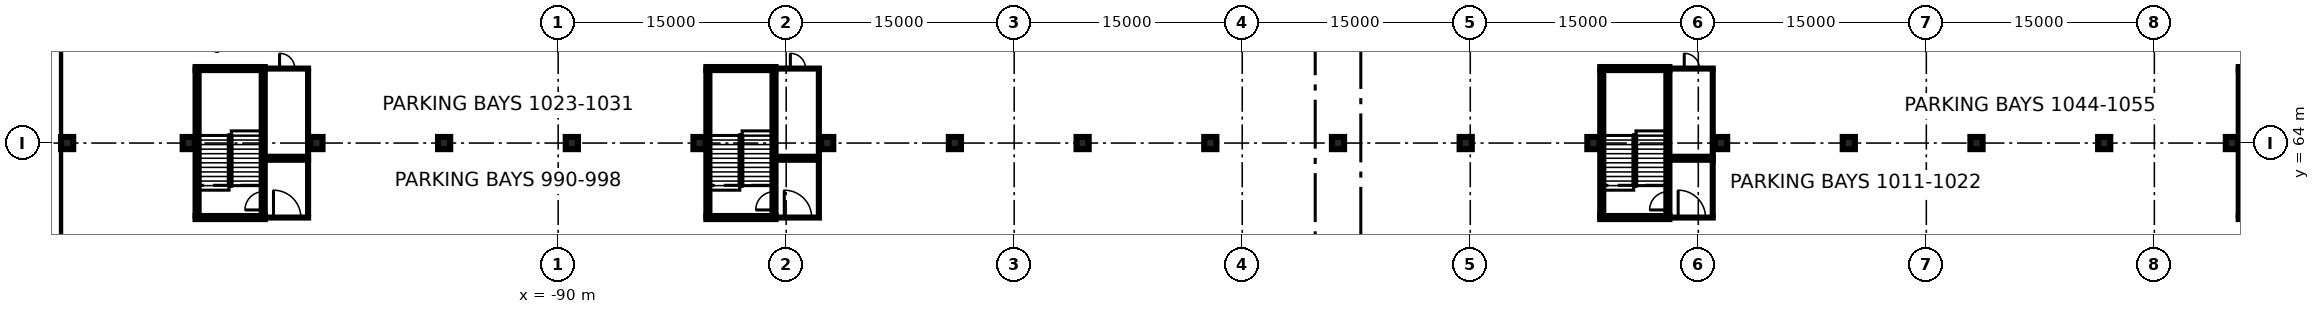
"""IFC4 building model, lengths in metres.
Left out: names, types, materials, properties, quantities, classifications, styles, units other than length and angle.
Written with IfcOpenShell. Run it as: python <this file> out.ifc"""

import sys

from ifc_helpers import new_model, si_unit, direction, frame, frame_2d, origin, origin_2d, place, context, subcontext, project, spatial, rectangle, extrude, element, fill, save


model = new_model("IFC4")
c1 = context("Model", 3, precision=1e-05, world=origin(), true_north=direction((0.0, 1.0)))
c2 = subcontext(c1, "Body", "Model", "MODEL_VIEW")
j1 = project(units=[si_unit("LENGTHUNIT", "METRE"), si_unit("PLANEANGLEUNIT", "RADIAN")], contexts=[c1])
p1 = place(None, origin())
s1 = spatial("IfcSite", under=j1, at=p1, CompositionType="ELEMENT")
p2 = place(p1, origin())
s2 = spatial("IfcBuilding", under=s1, at=p2, CompositionType="ELEMENT")
p3 = place(p2, frame((0.0, 0.0, -12.0)))
s3 = spatial("IfcBuildingStorey", under=s2, at=p3, CompositionType="ELEMENT", Elevation=-12.0)
p4 = place(p3, frame((-123.15, -80.0, 0.0), z_axis=(0.0, 0.0, 1.0), x_axis=(0.0, 1.0, 0.0)))
e1 = element("IfcWall", 1, at=p4, inside=s3, PredefinedType="USERDEFINED", context=c2, shape_type="SweptSolid", body=[
    extrude(rectangle(XDim=160.0, YDim=0.9, at=frame_2d((80.0, 0.0))), origin(), (0.0, 0.0, 1.0), 11.55),
])
p5 = place(p2, frame((0.0, 0.0, -7.2)))
s4 = spatial("IfcBuildingStorey", under=s2, at=p5, CompositionType="ELEMENT", Elevation=-7.2)
for number, where, z_axis, x_axis in (
    (2, (-122.3, 64.0, -0.4), (0.0, 0.0, 1.0), (1.0, 0.0, 0.0)),
    (3, (-114.3, 64.0, -0.4), (0.0, 0.0, 1.0), (1.0, 0.0, 0.0)),
    (4, (-105.9, 64.0, -0.4), (0.0, 0.0, 1.0), (1.0, 0.0, 0.0)),
    (5, (-97.5, 64.0, -0.4), (0.0, 0.0, 1.0), (1.0, 0.0, 0.0)),
    (6, (-89.1, 64.0, -0.4), (0.0, 0.0, 1.0), (1.0, 0.0, 0.0)),
    (7, (-80.7, 64.0, -0.4), (0.0, 0.0, 1.0), (1.0, 0.0, 0.0)),
    (8, (-72.3, 64.0, -0.4), (0.0, 0.0, 1.0), (1.0, 0.0, 0.0)),
    (9, (-63.9, 64.0, -0.4), (0.0, 0.0, 1.0), (1.0, 0.0, 0.0)),
    (10, (-55.5, 64.0, -0.4), (0.0, 0.0, 1.0), (1.0, 0.0, 0.0)),
    (11, (-47.1, 64.0, -0.4), (0.0, 0.0, 1.0), (1.0, 0.0, 0.0)),
    (12, (-38.7, 64.0, -0.4), (0.0, 0.0, 1.0), (1.0, 0.0, 0.0)),
    (13, (-30.3, 64.0, -0.4), (0.0, 0.0, 1.0), (1.0, 0.0, 0.0)),
    (14, (-21.9, 64.0, -0.4), (0.0, 0.0, 1.0), (1.0, 0.0, 0.0)),
    (15, (-13.5, 64.0, -0.4), (0.0, 0.0, 1.0), (1.0, 0.0, 0.0)),
    (16, (-5.1, 64.0, -0.4), (0.0, 0.0, 1.0), (1.0, 0.0, 0.0)),
    (17, (3.3, 64.0, -0.4), (0.0, 0.0, 1.0), (1.0, 0.0, 0.0)),
    (18, (11.7, 64.0, -0.4), (0.0, 0.0, 1.0), (1.0, 0.0, 0.0)),
    (19, (20.1, 64.0, -0.4), (0.0, 0.0, 1.0), (1.0, 0.0, 0.0)),
):
    element("IfcColumn", number, at=place(p5, frame(where, z_axis=z_axis, x_axis=x_axis)), inside=s4, PredefinedType="COLUMN", context=c2, shape_type="SweptSolid", body=[
        extrude(rectangle(XDim=0.8, YDim=0.8, at=origin_2d()), origin(), (0.0, 0.0, 1.0), 3.6),
    ])
p6 = place(p5, frame((-109.3, 59.1, 0.0), z_axis=(0.0, 0.0, 1.0), x_axis=(1.0, 0.0, 0.0)))
e20 = element("IfcWall", 20, at=p6, inside=s4, PredefinedType="PARTITIONING", context=c2, shape_type="SweptSolid", body=[
    extrude(rectangle(XDim=2.95, YDim=0.2, at=frame_2d((1.475, 0.0))), origin(), (0.0, 0.0, 1.0), 3.2),
])
p7 = place(p6, frame((0.575, 0.0, 0.0)))
e21 = element("IfcOpeningElement", 21, at=p7, cuts=e20, PredefinedType="OPENING", context=c2, shape_type="SweptSolid", body=[
    extrude(rectangle(XDim=1.8, YDim=2.1, at=frame_2d((0.9, 1.05))), frame((0.0, 0.11, 0.0), z_axis=(0.0, -1.0, 0.0), x_axis=(1.0, 0.0, 0.0)), (0.0, 0.0, 1.0), 0.22),
])
p8 = place(p5, frame((-109.3, 62.9, 0.0), z_axis=(0.0, 0.0, 1.0), x_axis=(1.0, 0.0, 0.0)))
e22 = element("IfcWall", 22, at=p8, inside=s4, PredefinedType="PARTITIONING", context=c2, shape_type="SweptSolid", body=[
    extrude(rectangle(XDim=2.95, YDim=0.2, at=frame_2d((1.475, 0.0))), origin(), (0.0, 0.0, 1.0), 3.2),
])
p9 = place(p5, frame((-106.45, 59.2, 0.0), z_axis=(0.0, 0.0, 1.0), x_axis=(0.0, 1.0, 0.0)))
e23 = element("IfcWall", 23, at=p9, inside=s4, PredefinedType="PARTITIONING", context=c2, shape_type="SweptSolid", body=[
    extrude(rectangle(XDim=3.6, YDim=0.2, at=frame_2d((1.8, 0.0))), origin(), (0.0, 0.0, 1.0), 3.2),
])
p10 = place(p5, frame((-109.3, 63.1, 0.0), z_axis=(0.0, 0.0, 1.0), x_axis=(1.0, 0.0, 0.0)))
e24 = element("IfcWall", 24, at=p10, inside=s4, PredefinedType="PARTITIONING", context=c2, shape_type="SweptSolid", body=[
    extrude(rectangle(XDim=2.95, YDim=0.2, at=frame_2d((1.475, 0.0))), origin(), (0.0, 0.0, 1.0), 3.2),
])
p11 = place(p5, frame((-109.3, 68.9, 0.0), z_axis=(0.0, 0.0, 1.0), x_axis=(1.0, 0.0, 0.0)))
e25 = element("IfcWall", 25, at=p11, inside=s4, PredefinedType="PARTITIONING", context=c2, shape_type="SweptSolid", body=[
    extrude(rectangle(XDim=2.95, YDim=0.2, at=frame_2d((1.475, 0.0))), origin(), (0.0, 0.0, 1.0), 3.2),
])
p12 = place(p11, frame((0.975, 0.0, 0.0)))
e26 = element("IfcOpeningElement", 26, at=p12, cuts=e25, PredefinedType="OPENING", context=c2, shape_type="SweptSolid", body=[
    extrude(rectangle(XDim=1.0, YDim=2.1, at=frame_2d((0.5, 1.05))), frame((0.0, 0.11, 0.0), z_axis=(0.0, -1.0, 0.0), x_axis=(1.0, 0.0, 0.0)), (0.0, 0.0, 1.0), 0.22),
])
p13 = place(p5, frame((-106.45, 63.2, 0.0), z_axis=(0.0, 0.0, 1.0), x_axis=(0.0, 1.0, 0.0)))
e27 = element("IfcWall", 27, at=p13, inside=s4, PredefinedType="PARTITIONING", context=c2, shape_type="SweptSolid", body=[
    extrude(rectangle(XDim=5.6, YDim=0.2, at=frame_2d((2.8, 0.0))), origin(), (0.0, 0.0, 1.0), 3.2),
])
p14 = place(p5, frame((-75.7, 59.1, 0.0), z_axis=(0.0, 0.0, 1.0), x_axis=(1.0, 0.0, 0.0)))
e28 = element("IfcWall", 28, at=p14, inside=s4, PredefinedType="PARTITIONING", context=c2, shape_type="SweptSolid", body=[
    extrude(rectangle(XDim=2.95, YDim=0.2, at=frame_2d((1.475, 0.0))), origin(), (0.0, 0.0, 1.0), 3.2),
])
p15 = place(p14, frame((0.575, 0.0, 0.0)))
e29 = element("IfcOpeningElement", 29, at=p15, cuts=e28, PredefinedType="OPENING", context=c2, shape_type="SweptSolid", body=[
    extrude(rectangle(XDim=1.8, YDim=2.1, at=frame_2d((0.9, 1.05))), frame((0.0, 0.11, 0.0), z_axis=(0.0, -1.0, 0.0), x_axis=(1.0, 0.0, 0.0)), (0.0, 0.0, 1.0), 0.22),
])
p16 = place(p5, frame((-75.7, 62.9, 0.0), z_axis=(0.0, 0.0, 1.0), x_axis=(1.0, 0.0, 0.0)))
e30 = element("IfcWall", 30, at=p16, inside=s4, PredefinedType="PARTITIONING", context=c2, shape_type="SweptSolid", body=[
    extrude(rectangle(XDim=2.95, YDim=0.2, at=frame_2d((1.475, 0.0))), origin(), (0.0, 0.0, 1.0), 3.2),
])
p17 = place(p5, frame((-72.85, 59.2, 0.0), z_axis=(0.0, 0.0, 1.0), x_axis=(0.0, 1.0, 0.0)))
e31 = element("IfcWall", 31, at=p17, inside=s4, PredefinedType="PARTITIONING", context=c2, shape_type="SweptSolid", body=[
    extrude(rectangle(XDim=3.6, YDim=0.2, at=frame_2d((1.8, 0.0))), origin(), (0.0, 0.0, 1.0), 3.2),
])
p18 = place(p5, frame((-75.7, 63.1, 0.0), z_axis=(0.0, 0.0, 1.0), x_axis=(1.0, 0.0, 0.0)))
e32 = element("IfcWall", 32, at=p18, inside=s4, PredefinedType="PARTITIONING", context=c2, shape_type="SweptSolid", body=[
    extrude(rectangle(XDim=2.95, YDim=0.2, at=frame_2d((1.475, 0.0))), origin(), (0.0, 0.0, 1.0), 3.2),
])
p19 = place(p5, frame((-75.7, 68.9, 0.0), z_axis=(0.0, 0.0, 1.0), x_axis=(1.0, 0.0, 0.0)))
e33 = element("IfcWall", 33, at=p19, inside=s4, PredefinedType="PARTITIONING", context=c2, shape_type="SweptSolid", body=[
    extrude(rectangle(XDim=2.95, YDim=0.2, at=frame_2d((1.475, 0.0))), origin(), (0.0, 0.0, 1.0), 3.2),
])
p20 = place(p19, frame((0.975, 0.0, 0.0)))
e34 = element("IfcOpeningElement", 34, at=p20, cuts=e33, PredefinedType="OPENING", context=c2, shape_type="SweptSolid", body=[
    extrude(rectangle(XDim=1.0, YDim=2.1, at=frame_2d((0.5, 1.05))), frame((0.0, 0.11, 0.0), z_axis=(0.0, -1.0, 0.0), x_axis=(1.0, 0.0, 0.0)), (0.0, 0.0, 1.0), 0.22),
])
p21 = place(p5, frame((-72.85, 63.2, 0.0), z_axis=(0.0, 0.0, 1.0), x_axis=(0.0, 1.0, 0.0)))
e35 = element("IfcWall", 35, at=p21, inside=s4, PredefinedType="PARTITIONING", context=c2, shape_type="SweptSolid", body=[
    extrude(rectangle(XDim=5.6, YDim=0.2, at=frame_2d((2.8, 0.0))), origin(), (0.0, 0.0, 1.0), 3.2),
])
p22 = place(p5, frame((-16.9, 59.1, 0.0), z_axis=(0.0, 0.0, 1.0), x_axis=(1.0, 0.0, 0.0)))
e36 = element("IfcWall", 36, at=p22, inside=s4, PredefinedType="PARTITIONING", context=c2, shape_type="SweptSolid", body=[
    extrude(rectangle(XDim=2.95, YDim=0.2, at=frame_2d((1.475, 0.0))), origin(), (0.0, 0.0, 1.0), 3.2),
])
p23 = place(p22, frame((0.575, 0.0, 0.0)))
e37 = element("IfcOpeningElement", 37, at=p23, cuts=e36, PredefinedType="OPENING", context=c2, shape_type="SweptSolid", body=[
    extrude(rectangle(XDim=1.8, YDim=2.1, at=frame_2d((0.9, 1.05))), frame((0.0, 0.11, 0.0), z_axis=(0.0, -1.0, 0.0), x_axis=(1.0, 0.0, 0.0)), (0.0, 0.0, 1.0), 0.22),
])
p24 = place(p5, frame((-16.9, 62.9, 0.0), z_axis=(0.0, 0.0, 1.0), x_axis=(1.0, 0.0, 0.0)))
e38 = element("IfcWall", 38, at=p24, inside=s4, PredefinedType="PARTITIONING", context=c2, shape_type="SweptSolid", body=[
    extrude(rectangle(XDim=2.95, YDim=0.2, at=frame_2d((1.475, 0.0))), origin(), (0.0, 0.0, 1.0), 3.2),
])
p25 = place(p5, frame((-14.05, 59.2, 0.0), z_axis=(0.0, 0.0, 1.0), x_axis=(0.0, 1.0, 0.0)))
e39 = element("IfcWall", 39, at=p25, inside=s4, PredefinedType="PARTITIONING", context=c2, shape_type="SweptSolid", body=[
    extrude(rectangle(XDim=3.6, YDim=0.2, at=frame_2d((1.8, 0.0))), origin(), (0.0, 0.0, 1.0), 3.2),
])
p26 = place(p5, frame((-16.9, 63.1, 0.0), z_axis=(0.0, 0.0, 1.0), x_axis=(1.0, 0.0, 0.0)))
e40 = element("IfcWall", 40, at=p26, inside=s4, PredefinedType="PARTITIONING", context=c2, shape_type="SweptSolid", body=[
    extrude(rectangle(XDim=2.95, YDim=0.2, at=frame_2d((1.475, 0.0))), origin(), (0.0, 0.0, 1.0), 3.2),
])
p27 = place(p5, frame((-16.9, 68.9, 0.0), z_axis=(0.0, 0.0, 1.0), x_axis=(1.0, 0.0, 0.0)))
e41 = element("IfcWall", 41, at=p27, inside=s4, PredefinedType="PARTITIONING", context=c2, shape_type="SweptSolid", body=[
    extrude(rectangle(XDim=2.95, YDim=0.2, at=frame_2d((1.475, 0.0))), origin(), (0.0, 0.0, 1.0), 3.2),
])
p28 = place(p27, frame((0.975, 0.0, 0.0)))
e42 = element("IfcOpeningElement", 42, at=p28, cuts=e41, PredefinedType="OPENING", context=c2, shape_type="SweptSolid", body=[
    extrude(rectangle(XDim=1.0, YDim=2.1, at=frame_2d((0.5, 1.05))), frame((0.0, 0.11, 0.0), z_axis=(0.0, -1.0, 0.0), x_axis=(1.0, 0.0, 0.0)), (0.0, 0.0, 1.0), 0.22),
])
p29 = place(p5, frame((-14.05, 63.2, 0.0), z_axis=(0.0, 0.0, 1.0), x_axis=(0.0, 1.0, 0.0)))
e43 = element("IfcWall", 43, at=p29, inside=s4, PredefinedType="PARTITIONING", context=c2, shape_type="SweptSolid", body=[
    extrude(rectangle(XDim=5.6, YDim=0.2, at=frame_2d((2.8, 0.0))), origin(), (0.0, 0.0, 1.0), 3.2),
])
p30 = place(p5, frame((-113.75, 59.2, 0.0), z_axis=(0.0, 0.0, 1.0), x_axis=(0.0, 1.0, 0.0)))
e44 = element("IfcWall", 44, at=p30, inside=s4, PredefinedType="SOLIDWALL", context=c2, shape_type="SweptSolid", body=[
    extrude(rectangle(XDim=9.6, YDim=0.2, at=frame_2d((4.8, 0.0))), origin(), (0.0, 0.0, 1.0), 3.2),
])
p31 = place(p5, frame((-109.4, 59.2, 0.0), z_axis=(0.0, 0.0, 1.0), x_axis=(0.0, 1.0, 0.0)))
e45 = element("IfcWall", 45, at=p31, inside=s4, PredefinedType="SOLIDWALL", context=c2, shape_type="SweptSolid", body=[
    extrude(rectangle(XDim=9.6, YDim=0.2, at=frame_2d((4.8, 0.0))), origin(), (0.0, 0.0, 1.0), 3.2),
])
p32 = place(p31, frame((0.4, 0.0, 0.0)))
e46 = element("IfcOpeningElement", 46, at=p32, cuts=e45, PredefinedType="OPENING", context=c2, shape_type="SweptSolid", body=[
    extrude(rectangle(XDim=1.2, YDim=2.1, at=frame_2d((0.6, 1.05))), frame((0.0, 0.11, 0.0), z_axis=(0.0, -1.0, 0.0), x_axis=(1.0, 0.0, 0.0)), (0.0, 0.0, 1.0), 0.22),
])
for number, where, z_axis, x_axis in (
    (47, (-109.3, 59.1, 0.0), (0.0, 0.0, 1.0), (-1.0, 0.0, 0.0)),
    (48, (-113.85, 68.9, 0.0), (0.0, 0.0, 1.0), (1.0, 0.0, 0.0)),
):
    element("IfcWall", number, at=place(p5, frame(where, z_axis=z_axis, x_axis=x_axis)), inside=s4, PredefinedType="SOLIDWALL", context=c2, shape_type="SweptSolid", body=[
        extrude(rectangle(XDim=4.55, YDim=0.2, at=frame_2d((2.275, 0.0))), origin(), (0.0, 0.0, 1.0), 3.2),
    ])
p33 = place(p5, frame((-80.15, 59.2, 0.0), z_axis=(0.0, 0.0, 1.0), x_axis=(0.0, 1.0, 0.0)))
e49 = element("IfcWall", 49, at=p33, inside=s4, PredefinedType="SOLIDWALL", context=c2, shape_type="SweptSolid", body=[
    extrude(rectangle(XDim=9.6, YDim=0.2, at=frame_2d((4.8, 0.0))), origin(), (0.0, 0.0, 1.0), 3.2),
])
p34 = place(p5, frame((-75.8, 59.2, 0.0), z_axis=(0.0, 0.0, 1.0), x_axis=(0.0, 1.0, 0.0)))
e50 = element("IfcWall", 50, at=p34, inside=s4, PredefinedType="SOLIDWALL", context=c2, shape_type="SweptSolid", body=[
    extrude(rectangle(XDim=9.6, YDim=0.2, at=frame_2d((4.8, 0.0))), origin(), (0.0, 0.0, 1.0), 3.2),
])
p35 = place(p34, frame((0.4, 0.0, 0.0)))
e51 = element("IfcOpeningElement", 51, at=p35, cuts=e50, PredefinedType="OPENING", context=c2, shape_type="SweptSolid", body=[
    extrude(rectangle(XDim=1.2, YDim=2.1, at=frame_2d((0.6, 1.05))), frame((0.0, 0.11, 0.0), z_axis=(0.0, -1.0, 0.0), x_axis=(1.0, 0.0, 0.0)), (0.0, 0.0, 1.0), 0.22),
])
for number, where, z_axis, x_axis in (
    (52, (-75.7, 59.1, 0.0), (0.0, 0.0, 1.0), (-1.0, 0.0, 0.0)),
    (53, (-80.25, 68.9, 0.0), (0.0, 0.0, 1.0), (1.0, 0.0, 0.0)),
):
    element("IfcWall", number, at=place(p5, frame(where, z_axis=z_axis, x_axis=x_axis)), inside=s4, PredefinedType="SOLIDWALL", context=c2, shape_type="SweptSolid", body=[
        extrude(rectangle(XDim=4.55, YDim=0.2, at=frame_2d((2.275, 0.0))), origin(), (0.0, 0.0, 1.0), 3.2),
    ])
p36 = place(p5, frame((-21.35, 59.2, 0.0), z_axis=(0.0, 0.0, 1.0), x_axis=(0.0, 1.0, 0.0)))
e54 = element("IfcWall", 54, at=p36, inside=s4, PredefinedType="SOLIDWALL", context=c2, shape_type="SweptSolid", body=[
    extrude(rectangle(XDim=9.6, YDim=0.2, at=frame_2d((4.8, 0.0))), origin(), (0.0, 0.0, 1.0), 3.2),
])
p37 = place(p5, frame((-17.0, 59.2, 0.0), z_axis=(0.0, 0.0, 1.0), x_axis=(0.0, 1.0, 0.0)))
e55 = element("IfcWall", 55, at=p37, inside=s4, PredefinedType="SOLIDWALL", context=c2, shape_type="SweptSolid", body=[
    extrude(rectangle(XDim=9.6, YDim=0.2, at=frame_2d((4.8, 0.0))), origin(), (0.0, 0.0, 1.0), 3.2),
])
p38 = place(p37, frame((0.4, 0.0, 0.0)))
e56 = element("IfcOpeningElement", 56, at=p38, cuts=e55, PredefinedType="OPENING", context=c2, shape_type="SweptSolid", body=[
    extrude(rectangle(XDim=1.2, YDim=2.1, at=frame_2d((0.6, 1.05))), frame((0.0, 0.11, 0.0), z_axis=(0.0, -1.0, 0.0), x_axis=(1.0, 0.0, 0.0)), (0.0, 0.0, 1.0), 0.22),
])
for number, where, z_axis, x_axis in (
    (57, (-16.9, 59.1, 0.0), (0.0, 0.0, 1.0), (-1.0, 0.0, 0.0)),
    (58, (-21.45, 68.9, 0.0), (0.0, 0.0, 1.0), (1.0, 0.0, 0.0)),
):
    element("IfcWall", number, at=place(p5, frame(where, z_axis=z_axis, x_axis=x_axis)), inside=s4, PredefinedType="SOLIDWALL", context=c2, shape_type="SweptSolid", body=[
        extrude(rectangle(XDim=4.55, YDim=0.2, at=frame_2d((2.275, 0.0))), origin(), (0.0, 0.0, 1.0), 3.2),
    ])
p39 = place(p5, frame((20.65, 59.2, 0.0), z_axis=(0.0, 0.0, 1.0), x_axis=(0.0, 1.0, 0.0)))
e59 = element("IfcWall", 59, at=p39, inside=s4, PredefinedType="SOLIDWALL", context=c2, shape_type="SweptSolid", body=[
    extrude(rectangle(XDim=9.6, YDim=0.2, at=frame_2d((4.8, 0.0))), origin(), (0.0, 0.0, 1.0), 3.2),
])
for number, where, z_axis, x_axis in (
    (60, (25.1, 59.1, 0.0), (0.0, 0.0, 1.0), (-1.0, 0.0, 0.0)),
    (61, (20.55, 68.9, 0.0), (0.0, 0.0, 1.0), (1.0, 0.0, 0.0)),
):
    element("IfcWall", number, at=place(p5, frame(where, z_axis=z_axis, x_axis=x_axis)), inside=s4, PredefinedType="SOLIDWALL", context=c2, shape_type="SweptSolid", body=[
        extrude(rectangle(XDim=4.55, YDim=0.2, at=frame_2d((2.275, 0.0))), origin(), (0.0, 0.0, 1.0), 3.2),
    ])
p40 = place(p7, origin())
e62 = element("IfcDoor", 62, at=p40, inside=s4, OperationType="DOUBLE_DOOR_SINGLE_SWING", PredefinedType="DOOR", context=c2, shape_type="SweptSolid", body=[
    extrude(rectangle(XDim=1.8, YDim=2.1, at=frame_2d((0.9, 1.05))), frame((0.0, 0.025, 0.0), z_axis=(0.0, -1.0, 0.0), x_axis=(1.0, 0.0, 0.0)), (0.0, 0.0, 1.0), 0.05),
])
fill(e21, e62)
p41 = place(p12, origin())
e63 = element("IfcDoor", 63, at=p41, inside=s4, OperationType="SINGLE_SWING_LEFT", PredefinedType="DOOR", context=c2, shape_type="SweptSolid", body=[
    extrude(rectangle(XDim=1.0, YDim=2.1, at=frame_2d((0.5, 1.05))), frame((0.0, 0.025, 0.0), z_axis=(0.0, -1.0, 0.0), x_axis=(1.0, 0.0, 0.0)), (0.0, 0.0, 1.0), 0.05),
])
fill(e26, e63)
p42 = place(p15, origin())
e64 = element("IfcDoor", 64, at=p42, inside=s4, OperationType="DOUBLE_DOOR_SINGLE_SWING", PredefinedType="DOOR", context=c2, shape_type="SweptSolid", body=[
    extrude(rectangle(XDim=1.8, YDim=2.1, at=frame_2d((0.9, 1.05))), frame((0.0, 0.025, 0.0), z_axis=(0.0, -1.0, 0.0), x_axis=(1.0, 0.0, 0.0)), (0.0, 0.0, 1.0), 0.05),
])
fill(e29, e64)
p43 = place(p20, origin())
e65 = element("IfcDoor", 65, at=p43, inside=s4, OperationType="SINGLE_SWING_LEFT", PredefinedType="DOOR", context=c2, shape_type="SweptSolid", body=[
    extrude(rectangle(XDim=1.0, YDim=2.1, at=frame_2d((0.5, 1.05))), frame((0.0, 0.025, 0.0), z_axis=(0.0, -1.0, 0.0), x_axis=(1.0, 0.0, 0.0)), (0.0, 0.0, 1.0), 0.05),
])
fill(e34, e65)
p44 = place(p23, origin())
e66 = element("IfcDoor", 66, at=p44, inside=s4, OperationType="DOUBLE_DOOR_SINGLE_SWING", PredefinedType="DOOR", context=c2, shape_type="SweptSolid", body=[
    extrude(rectangle(XDim=1.8, YDim=2.1, at=frame_2d((0.9, 1.05))), frame((0.0, 0.025, 0.0), z_axis=(0.0, -1.0, 0.0), x_axis=(1.0, 0.0, 0.0)), (0.0, 0.0, 1.0), 0.05),
])
fill(e37, e66)
p45 = place(p28, origin())
e67 = element("IfcDoor", 67, at=p45, inside=s4, OperationType="SINGLE_SWING_LEFT", PredefinedType="DOOR", context=c2, shape_type="SweptSolid", body=[
    extrude(rectangle(XDim=1.0, YDim=2.1, at=frame_2d((0.5, 1.05))), frame((0.0, 0.025, 0.0), z_axis=(0.0, -1.0, 0.0), x_axis=(1.0, 0.0, 0.0)), (0.0, 0.0, 1.0), 0.05),
])
fill(e42, e67)
p46 = place(p32, origin())
e68 = element("IfcDoor", 68, at=p46, inside=s4, OperationType="SINGLE_SWING_LEFT", PredefinedType="DOOR", context=c2, shape_type="SweptSolid", body=[
    extrude(rectangle(XDim=1.2, YDim=2.1, at=frame_2d((0.6, 1.05))), frame((0.0, 0.025, 0.0), z_axis=(0.0, -1.0, 0.0), x_axis=(1.0, 0.0, 0.0)), (0.0, 0.0, 1.0), 0.05),
])
fill(e46, e68)
p47 = place(p35, origin())
e69 = element("IfcDoor", 69, at=p47, inside=s4, OperationType="SINGLE_SWING_LEFT", PredefinedType="DOOR", context=c2, shape_type="SweptSolid", body=[
    extrude(rectangle(XDim=1.2, YDim=2.1, at=frame_2d((0.6, 1.05))), frame((0.0, 0.025, 0.0), z_axis=(0.0, -1.0, 0.0), x_axis=(1.0, 0.0, 0.0)), (0.0, 0.0, 1.0), 0.05),
])
fill(e51, e69)
p48 = place(p38, origin())
e70 = element("IfcDoor", 70, at=p48, inside=s4, OperationType="SINGLE_SWING_LEFT", PredefinedType="DOOR", context=c2, shape_type="SweptSolid", body=[
    extrude(rectangle(XDim=1.2, YDim=2.1, at=frame_2d((0.6, 1.05))), frame((0.0, 0.025, 0.0), z_axis=(0.0, -1.0, 0.0), x_axis=(1.0, 0.0, 0.0)), (0.0, 0.0, 1.0), 0.05),
])
fill(e56, e70)
save(model, sys.argv[1])
